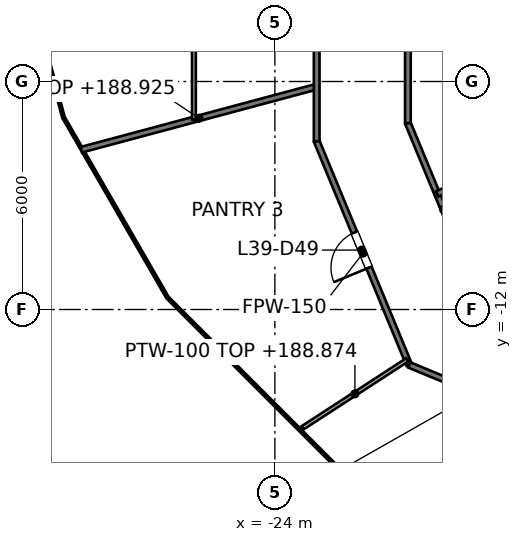
"""IFC4 building model, lengths in metres.
Left out: names, types, materials, properties, quantities, classifications, styles, units other than length and angle.
Written with IfcOpenShell. Run it as: python <this file> out.ifc"""

import sys

from ifc_helpers import new_model, si_unit, direction, frame, frame_2d, origin, place, context, subcontext, project, spatial, rectangle, extrude, element, fill, save


model = new_model("IFC4")
c1 = context("Model", 3, precision=1e-05, world=origin(), true_north=direction((0.0, 1.0)))
c2 = subcontext(c1, "Body", "Model", "MODEL_VIEW")
j1 = project(units=[si_unit("LENGTHUNIT", "METRE"), si_unit("PLANEANGLEUNIT", "RADIAN")], contexts=[c1])
p1 = place(None, origin())
s1 = spatial("IfcSite", under=j1, at=p1, CompositionType="ELEMENT")
p2 = place(p1, origin())
s2 = spatial("IfcBuilding", under=s1, at=p2, CompositionType="ELEMENT")
p3 = place(p2, frame((0.0, 0.0, 185.6)))
s3 = spatial("IfcBuildingStorey", under=s2, at=p3, CompositionType="ELEMENT", Elevation=185.6)
p4 = place(p3, frame((-22.9, -7.572, 0.0), z_axis=(0.0, 0.0, 1.0), x_axis=(0.382367581622, -0.924010298928, 0.0)))
e1 = element("IfcWall", 1, at=p4, inside=s3, PredefinedType="PARTITIONING", context=c2, shape_type="SweptSolid", body=[
    extrude(rectangle(XDim=6.374, YDim=0.15, at=frame_2d((3.187, 0.0))), origin(), (0.0, 0.0, 1.0), 2.777),
])
p5 = place(p4, frame((2.6, 0.0, 0.0)))
e2 = element("IfcOpeningElement", 2, at=p5, cuts=e1, PredefinedType="OPENING", context=c2, shape_type="SweptSolid", body=[
    extrude(rectangle(XDim=1.0, YDim=2.1, at=frame_2d((0.5, 1.05))), frame((0.0, 0.075, 0.0), z_axis=(0.0, -1.0, 0.0), x_axis=(1.0, 0.0, 0.0)), (0.0, 0.0, 1.0), 0.15),
])
p6 = place(p3, frame((-20.5, -7.095, 0.0), z_axis=(0.0, 0.0, 1.0), x_axis=(0.382364990163, -0.924011371303, 0.0)))
e3 = element("IfcWall", 3, at=p6, inside=s3, PredefinedType="PARTITIONING", context=c2, shape_type="SweptSolid", body=[
    extrude(rectangle(XDim=4.902, YDim=0.15, at=frame_2d((2.451, 0.0))), origin(), (0.0, 0.0, 1.0), 2.845),
])
p7 = place(p3, frame((-20.46, -13.46, 0.0), z_axis=(0.0, 0.0, 1.0), x_axis=(0.923801547606, -0.382871650349, 0.0)))
e4 = element("IfcWall", 4, at=p7, inside=s3, PredefinedType="PARTITIONING", context=c2, shape_type="SweptSolid", body=[
    extrude(rectangle(XDim=6.415, YDim=0.15, at=frame_2d((3.208, 0.0))), origin(), (0.0, 0.0, 1.0), 2.777),
])
p8 = place(p7, frame((2.707, 0.0, 0.0)))
e5 = element("IfcOpeningElement", 5, at=p8, cuts=e4, PredefinedType="OPENING", context=c2, shape_type="SweptSolid", body=[
    extrude(rectangle(XDim=1.0, YDim=2.1, at=frame_2d((0.5, 1.05))), frame((0.0, 0.075, 0.0), z_axis=(0.0, -1.0, 0.0), x_axis=(1.0, 0.0, 0.0)), (0.0, 0.0, 1.0), 0.15),
])
p9 = place(p3, frame((-29.094, -7.796, 0.0), z_axis=(0.0, 0.0, 1.0), x_axis=(0.965917630497, 0.258849630277, 0.0)))
e6 = element("IfcWall", 6, at=p9, inside=s3, PredefinedType="PARTITIONING", context=c2, shape_type="SweptSolid", body=[
    extrude(rectangle(XDim=6.413, YDim=0.15, at=frame_2d((3.206, 0.0))), origin(), (0.0, 0.0, 1.0), 3.325),
])
p10 = place(p3, frame((-19.728, -8.958, 0.0), z_axis=(0.0, 0.0, 1.0), x_axis=(0.910629511797, 0.413223779863, 0.0)))
e7 = element("IfcWall", 7, at=p10, inside=s3, PredefinedType="PARTITIONING", context=c2, shape_type="SweptSolid", body=[
    extrude(rectangle(XDim=5.368, YDim=0.15, at=frame_2d((2.684, 0.0))), origin(), (0.0, 0.0, 1.0), 3.7),
])
p11 = place(p3, frame((-20.5, -7.095, 0.0), z_axis=(0.0, 0.0, 1.0), x_axis=(0.0, 1.0, 0.0)))
e8 = element("IfcWall", 8, at=p11, inside=s3, PredefinedType="PARTITIONING", context=c2, shape_type="SweptSolid", body=[
    extrude(rectangle(XDim=14.569, YDim=0.15, at=frame_2d((7.285, 0.0))), origin(), (0.0, 0.0, 1.0), 2.768),
])
p12 = place(p11, frame((10.234, 0.0, 0.0)))
e9 = element("IfcOpeningElement", 9, at=p12, cuts=e8, PredefinedType="OPENING", context=c2, shape_type="SweptSolid", body=[
    extrude(rectangle(XDim=1.0, YDim=2.1, at=frame_2d((0.5, 1.05))), frame((0.0, 0.075, 0.0), z_axis=(0.0, -1.0, 0.0), x_axis=(1.0, 0.0, 0.0)), (0.0, 0.0, 1.0), 0.15),
])
p13 = place(p11, frame((3.0, 0.0, 0.0)))
e10 = element("IfcOpeningElement", 10, at=p13, cuts=e8, PredefinedType="OPENING", context=c2, shape_type="SweptSolid", body=[
    extrude(rectangle(XDim=1.0, YDim=2.1, at=frame_2d((0.5, 1.05))), frame((0.0, 0.075, 0.0), z_axis=(0.0, -1.0, 0.0), x_axis=(1.0, 0.0, 0.0)), (0.0, 0.0, 1.0), 0.15),
])
p14 = place(p3, frame((-22.9, -7.572, 0.0), z_axis=(0.0, 0.0, 1.0), x_axis=(0.0, 1.0, 0.0)))
e11 = element("IfcWall", 11, at=p14, inside=s3, PredefinedType="PARTITIONING", context=c2, shape_type="SweptSolid", body=[
    extrude(rectangle(XDim=15.689, YDim=0.15, at=frame_2d((7.844, 0.0))), origin(), (0.0, 0.0, 1.0), 2.768),
])
p15 = place(p14, frame((6.438, 0.0, 0.0)))
e12 = element("IfcOpeningElement", 12, at=p15, cuts=e11, PredefinedType="OPENING", context=c2, shape_type="SweptSolid", body=[
    extrude(rectangle(XDim=1.0, YDim=2.1, at=frame_2d((0.5, 1.05))), frame((0.0, 0.075, 0.0), z_axis=(0.0, -1.0, 0.0), x_axis=(1.0, 0.0, 0.0)), (0.0, 0.0, 1.0), 0.15),
])
p16 = place(p3, frame((-23.271, -15.113, 0.0), z_axis=(0.0, 0.0, 1.0), x_axis=(0.83866769183, 0.544643463819, 0.0)))
e13 = element("IfcWall", 13, at=p16, inside=s3, PredefinedType="PARTITIONING", context=c2, shape_type="SweptSolid", body=[
    extrude(rectangle(XDim=3.285, YDim=0.1, at=frame_2d((1.643, 0.0))), origin(), (0.0, 0.0, 1.0), 3.273),
])
p17 = place(p3, frame((-26.13, -7.002, 0.0), z_axis=(0.0, 0.0, 1.0), x_axis=(0.0, 1.0, 0.0)))
e14 = element("IfcWall", 14, at=p17, inside=s3, PredefinedType="PARTITIONING", context=c2, shape_type="SweptSolid", body=[
    extrude(rectangle(XDim=15.985, YDim=0.1, at=frame_2d((7.992, 0.0))), origin(), (0.0, 0.0, 1.0), 2.768),
])
p18 = place(p17, frame((5.828, 0.0, 0.0)))
e15 = element("IfcOpeningElement", 15, at=p18, cuts=e14, PredefinedType="OPENING", context=c2, shape_type="SweptSolid", body=[
    extrude(rectangle(XDim=0.9, YDim=2.1, at=frame_2d((0.45, 1.05))), frame((0.0, 0.05, 0.0), z_axis=(0.0, -1.0, 0.0), x_axis=(1.0, 0.0, 0.0)), (0.0, 0.0, 1.0), 0.1),
])
p19 = place(p5, origin())
e16 = element("IfcDoor", 16, at=p19, inside=s3, OperationType="SINGLE_SWING_RIGHT", PredefinedType="DOOR", context=c2, shape_type="SweptSolid", body=[
    extrude(rectangle(XDim=1.0, YDim=2.1, at=frame_2d((0.5, 1.05))), frame((0.0, 0.025, 0.0), z_axis=(0.0, -1.0, 0.0), x_axis=(1.0, 0.0, 0.0)), (0.0, 0.0, 1.0), 0.05),
])
fill(e2, e16)
save(model, sys.argv[1])
